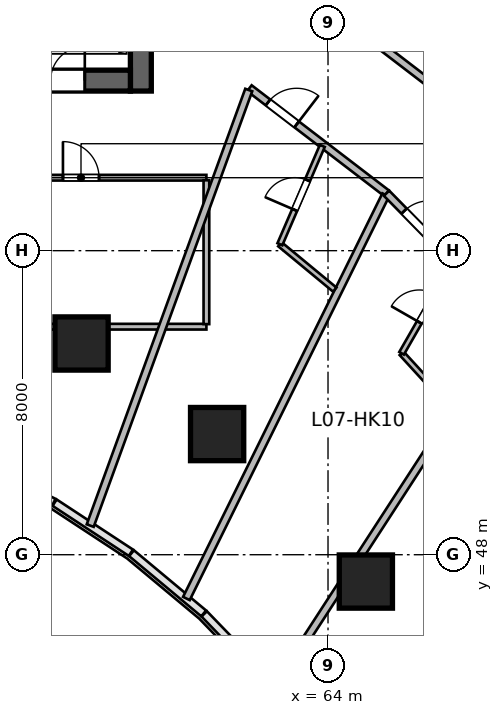
"""IFC4 building model, lengths in metres.
Left out: names, types, materials, properties, quantities, classifications, styles, units other than length and angle.
Written with IfcOpenShell. Run it as: python <this file> out.ifc"""

import sys

from ifc_helpers import new_model, si_unit, direction, frame, frame_2d, origin, origin_2d, place, context, subcontext, project, spatial, rectangle, circle, extrude, source, transform, mapped, element, fill, save


model = new_model("IFC4")
c1 = context("Model", 3, precision=1e-05, world=origin(), true_north=direction((0.0, 1.0)))
c2 = subcontext(c1, "Body", "Model", "MODEL_VIEW")
j1 = project(units=[si_unit("LENGTHUNIT", "METRE"), si_unit("PLANEANGLEUNIT", "RADIAN")], contexts=[c1])
p1 = place(None, origin())
s1 = spatial("IfcSite", under=j1, at=p1, CompositionType="ELEMENT")
p2 = place(p1, origin())
s2 = spatial("IfcBuilding", under=s1, at=p2, CompositionType="ELEMENT")
p3 = place(p2, frame((0.0, 0.0, 39.0)))
s3 = spatial("IfcBuildingStorey", under=s2, at=p3, CompositionType="ELEMENT", Elevation=39.0)
m1 = source(origin(), c2, "Body", "SweptSolid", [
    extrude(rectangle(XDim=12.0, YDim=0.55, at=frame_2d((6.0, 0.0))), origin(), (0.0, 0.0, 1.0), 3.6),
])
p4 = place(p3, frame((59.075, 60.2, 0.0), z_axis=(0.0, 0.0, 1.0), x_axis=(0.0, 1.0, 0.0)))
e1 = element("IfcWall", 1, at=p4, inside=s3, PredefinedType="SHEAR", context=c2, shape_type="MappedRepresentation", body=[
    mapped(m1, transform((0.0, 0.0, 0.0), scale=1.0)),
])
m2 = source(origin(), c2, "Body", "SweptSolid", [
    extrude(rectangle(XDim=21.6, YDim=0.55, at=frame_2d((10.8, 0.0))), origin(), (0.0, 0.0, 1.0), 3.6),
])
p5 = place(p3, frame((37.2, 60.475, 0.0), z_axis=(0.0, 0.0, 1.0), x_axis=(1.0, 0.0, 0.0)))
e2 = element("IfcWall", 2, at=p5, inside=s3, PredefinedType="SHEAR", context=c2, shape_type="MappedRepresentation", body=[
    mapped(m2, transform((0.0, 0.0, 0.0), scale=1.0)),
])
p6 = place(p5, frame((1.1, 0.0, 0.0)))
e3 = element("IfcOpeningElement", 3, at=p6, cuts=e2, PredefinedType="OPENING", context=c2, shape_type="SweptSolid", body=[
    extrude(rectangle(XDim=1.15, YDim=2.15, at=frame_2d((0.575, 1.075))), frame((0.0, 0.285, 0.0), z_axis=(0.0, -1.0, 0.0), x_axis=(1.0, 0.0, 0.0)), (0.0, 0.0, 1.0), 0.57),
])
p7 = place(p5, frame((19.5, 0.0, 0.0)))
e4 = element("IfcOpeningElement", 4, at=p7, cuts=e2, PredefinedType="OPENING", context=c2, shape_type="SweptSolid", body=[
    extrude(rectangle(XDim=0.9, YDim=2.1, at=frame_2d((0.45, 1.05))), frame((0.0, 0.285, 0.0), z_axis=(0.0, -1.0, 0.0), x_axis=(1.0, 0.0, 0.0)), (0.0, 0.0, 1.0), 0.57),
])
p8 = place(p5, frame((12.02, 0.0, 0.0)))
e5 = element("IfcOpeningElement", 5, at=p8, cuts=e2, PredefinedType="OPENING", context=c2, shape_type="SweptSolid", body=[
    extrude(rectangle(XDim=1.6, YDim=2.15, at=frame_2d((0.8, 1.075))), frame((0.0, 0.285, 0.0), z_axis=(0.0, -1.0, 0.0), x_axis=(1.0, 0.0, 0.0)), (0.0, 0.0, 1.0), 0.57),
])
m3 = source(origin(), c2, "Body", "SweptSolid", [
    extrude(circle(Radius=0.7, at=origin_2d()), origin(), (0.0, 0.0, 1.0), 3.6),
])
for number, where, z_axis, x_axis in (
    (6, (57.515, 53.558, 0.0), (0.0, 0.0, 1.0), (0.289, 0.957, 0.0)),
    (7, (61.082, 51.175, 0.0), (0.0, 0.0, 1.0), (0.409, 0.912, 0.0)),
    (8, (64.996, 47.294, 0.0), (0.0, 0.0, 1.0), (0.558, 0.83, 0.0)),
):
    element("IfcColumn", number, at=place(p3, frame(where, z_axis=z_axis, x_axis=x_axis)), inside=s3, PredefinedType="COLUMN", context=c2, shape_type="MappedRepresentation", body=[
        mapped(m3, transform((0.0, 0.0, 0.0), scale=1.0)),
    ])
m4 = source(origin(), c2, "Body", "SweptSolid", [
    extrude(rectangle(XDim=6.6, YDim=0.15, at=frame_2d((3.3, 0.0))), origin(), (0.0, 0.0, 1.0), 2.803),
])
p9 = place(p3, frame((54.2, 54.0, 0.0), z_axis=(0.0, 0.0, 1.0), x_axis=(1.0, 0.0, 0.0)))
e9 = element("IfcWall", 9, at=p9, inside=s3, PredefinedType="PARTITIONING", context=c2, shape_type="MappedRepresentation", body=[
    mapped(m4, transform((0.0, 0.0, 0.0), scale=1.0)),
])
m5 = source(origin(), c2, "Body", "SweptSolid", [
    extrude(rectangle(XDim=6.6, YDim=0.15, at=frame_2d((3.3, 0.0))), origin(), (0.0, 0.0, 1.0), 3.36),
])
p10 = place(p3, frame((54.2, 57.92, 0.0), z_axis=(0.0, 0.0, 1.0), x_axis=(1.0, 0.0, 0.0)))
e10 = element("IfcWall", 10, at=p10, inside=s3, PredefinedType="PARTITIONING", context=c2, shape_type="MappedRepresentation", body=[
    mapped(m5, transform((0.0, 0.0, 0.0), scale=1.0)),
])
p11 = place(p10, frame((2.825, 0.0, 0.0)))
e11 = element("IfcOpeningElement", 11, at=p11, cuts=e10, PredefinedType="OPENING", context=c2, shape_type="SweptSolid", body=[
    extrude(rectangle(XDim=0.95, YDim=2.1, at=frame_2d((0.475, 1.05))), frame((0.0, 0.085, 0.0), z_axis=(0.0, -1.0, 0.0), x_axis=(1.0, 0.0, 0.0)), (0.0, 0.0, 1.0), 0.17),
])
m6 = source(origin(), c2, "Body", "SweptSolid", [
    extrude(rectangle(XDim=3.785, YDim=0.15, at=frame_2d((1.893, 0.0))), origin(), (0.0, 0.0, 1.0), 3.36),
])
p12 = place(p3, frame((60.8, 54.067, 0.0), z_axis=(0.0, 0.0, 1.0), x_axis=(0.0, 1.0, 0.0)))
e12 = element("IfcWall", 12, at=p12, inside=s3, PredefinedType="PARTITIONING", context=c2, shape_type="MappedRepresentation", body=[
    mapped(m6, transform((0.0, 0.0, 0.0), scale=1.0)),
])
m7 = source(origin(), c2, "Body", "SweptSolid", [
    extrude(rectangle(XDim=4.895, YDim=0.195, at=frame_2d((2.447, 0.0))), origin(), (0.0, 0.0, 1.0), 3.36),
])
p13 = place(p3, frame((63.001, 63.214, 0.0), z_axis=(0.0, 0.0, 1.0), x_axis=(0.793896075849, -0.608053468661, 0.0)))
e13 = element("IfcWall", 13, at=p13, inside=s3, PredefinedType="PARTITIONING", context=c2, shape_type="MappedRepresentation", body=[
    mapped(m7, transform((0.0, 0.0, 0.0), scale=1.0)),
])
p14 = place(p13, frame((0.7, 0.0, 0.0)))
e14 = element("IfcOpeningElement", 14, at=p14, cuts=e13, PredefinedType="OPENING", context=c2, shape_type="SweptSolid", body=[
    extrude(rectangle(XDim=0.95, YDim=2.15, at=frame_2d((0.475, 1.075))), frame((0.0, 0.107, 0.0), z_axis=(0.0, -1.0, 0.0), x_axis=(1.0, 0.0, 0.0)), (0.0, 0.0, 1.0), 0.215),
])
m8 = source(origin(), c2, "Body", "SweptSolid", [
    extrude(rectangle(XDim=4.546, YDim=0.195, at=frame_2d((2.273, 0.0))), origin(), (0.0, 0.0, 1.0), 3.36),
])
p15 = place(p3, frame((61.931, 60.275, 0.0), z_axis=(0.0, 0.0, 1.0), x_axis=(0.793907931297, -0.608037989457, 0.0)))
e15 = element("IfcWall", 15, at=p15, inside=s3, PredefinedType="PARTITIONING", context=c2, shape_type="MappedRepresentation", body=[
    mapped(m8, transform((0.0, 0.0, 0.0), scale=1.0)),
])
p16 = place(p15, frame((0.616, 0.0, 0.0)))
e16 = element("IfcOpeningElement", 16, at=p16, cuts=e15, PredefinedType="OPENING", context=c2, shape_type="SweptSolid", body=[
    extrude(rectangle(XDim=0.95, YDim=2.15, at=frame_2d((0.475, 1.075))), frame((0.0, 0.107, 0.0), z_axis=(0.0, -1.0, 0.0), x_axis=(1.0, 0.0, 0.0)), (0.0, 0.0, 1.0), 0.215),
])
m9 = source(origin(), c2, "Body", "SweptSolid", [
    extrude(rectangle(XDim=12.196, YDim=0.195, at=frame_2d((6.098, 0.0))), origin(), (0.0, 0.0, 1.0), 3.36),
])
p17 = place(p3, frame((57.742, 48.766, 0.0), z_axis=(0.0, 0.0, 1.0), x_axis=(0.342022711534, 0.939691686031, 0.0)))
e17 = element("IfcWall", 17, at=p17, inside=s3, PredefinedType="PARTITIONING", context=c2, shape_type="MappedRepresentation", body=[
    mapped(m9, transform((0.0, 0.0, 0.0), scale=1.0)),
])
m10 = source(origin(), c2, "Body", "SweptSolid", [
    extrude(rectangle(XDim=11.844, YDim=0.195, at=frame_2d((5.922, 0.0))), origin(), (0.0, 0.0, 1.0), 3.36),
])
p18 = place(p3, frame((60.273, 46.848, 0.0), z_axis=(0.0, 0.0, 1.0), x_axis=(0.442871152218, 0.896585267854, 0.0)))
e18 = element("IfcWall", 18, at=p18, inside=s3, PredefinedType="PARTITIONING", context=c2, shape_type="MappedRepresentation", body=[
    mapped(m10, transform((0.0, 0.0, 0.0), scale=1.0)),
])
m11 = source(origin(), c2, "Body", "SweptSolid", [
    extrude(rectangle(XDim=1.873, YDim=0.14, at=frame_2d((0.937, 0.0))), origin(), (0.0, 0.0, 1.0), 3.36),
])
p19 = place(p3, frame((62.734, 56.169, 0.0), z_axis=(0.0, 0.0, 1.0), x_axis=(0.77069451688, -0.637204803537, 0.0)))
e19 = element("IfcWall", 19, at=p19, inside=s3, PredefinedType="PARTITIONING", context=c2, shape_type="MappedRepresentation", body=[
    mapped(m11, transform((0.0, 0.0, 0.0), scale=1.0)),
])
m12 = source(origin(), c2, "Body", "SweptSolid", [
    extrude(rectangle(XDim=2.817, YDim=0.14, at=frame_2d((1.409, 0.0))), origin(), (0.0, 0.0, 1.0), 3.36),
])
p20 = place(p3, frame((62.734, 56.169, 0.0), z_axis=(0.0, 0.0, 1.0), x_axis=(0.395999429727, 0.918250756415, 0.0)))
e20 = element("IfcWall", 20, at=p20, inside=s3, PredefinedType="PARTITIONING", context=c2, shape_type="MappedRepresentation", body=[
    mapped(m12, transform((0.0, 0.0, 0.0), scale=1.0)),
])
p21 = place(p20, frame((0.984, 0.0, 0.0)))
e21 = element("IfcOpeningElement", 21, at=p21, cuts=e20, PredefinedType="OPENING", context=c2, shape_type="SweptSolid", body=[
    extrude(rectangle(XDim=0.85, YDim=2.05, at=frame_2d((0.425, 1.025))), frame((0.0, 0.08, 0.0), z_axis=(0.0, -1.0, 0.0), x_axis=(1.0, 0.0, 0.0)), (0.0, 0.0, 1.0), 0.16),
])
m13 = source(origin(), c2, "Body", "SweptSolid", [
    extrude(rectangle(XDim=4.724, YDim=0.195, at=frame_2d((2.362, 0.0))), origin(), (0.0, 0.0, 1.0), 3.36),
])
p22 = place(p3, frame((65.541, 57.511, 0.0), z_axis=(0.0, 0.0, 1.0), x_axis=(0.700435057457, -0.713716141253, 0.0)))
e22 = element("IfcWall", 22, at=p22, inside=s3, PredefinedType="PARTITIONING", context=c2, shape_type="MappedRepresentation", body=[
    mapped(m13, transform((0.0, 0.0, 0.0), scale=1.0)),
])
p23 = place(p22, frame((0.659, 0.0, 0.0)))
e23 = element("IfcOpeningElement", 23, at=p23, cuts=e22, PredefinedType="OPENING", context=c2, shape_type="SweptSolid", body=[
    extrude(rectangle(XDim=0.95, YDim=2.15, at=frame_2d((0.475, 1.075))), frame((0.0, 0.107, 0.0), z_axis=(0.0, -1.0, 0.0), x_axis=(1.0, 0.0, 0.0)), (0.0, 0.0, 1.0), 0.215),
])
m14 = source(origin(), c2, "Body", "SweptSolid", [
    extrude(rectangle(XDim=11.429, YDim=0.195, at=frame_2d((5.714, 0.0))), origin(), (0.0, 0.0, 1.0), 3.36),
])
p24 = place(p3, frame((62.604, 44.511, 0.0), z_axis=(0.0, 0.0, 1.0), x_axis=(0.544215487077, 0.838945471187, 0.0)))
e24 = element("IfcWall", 24, at=p24, inside=s3, PredefinedType="PARTITIONING", context=c2, shape_type="MappedRepresentation", body=[
    mapped(m14, transform((0.0, 0.0, 0.0), scale=1.0)),
])
m15 = source(origin(), c2, "Body", "SweptSolid", [
    extrude(rectangle(XDim=1.947, YDim=0.14, at=frame_2d((0.973, 0.0))), origin(), (0.0, 0.0, 1.0), 2.803),
])
p25 = place(p3, frame((65.936, 53.3, 0.0), z_axis=(0.0, 0.0, 1.0), x_axis=(0.675383794012, -0.737466426888, 0.0)))
e25 = element("IfcWall", 25, at=p25, inside=s3, PredefinedType="PARTITIONING", context=c2, shape_type="MappedRepresentation", body=[
    mapped(m15, transform((0.0, 0.0, 0.0), scale=1.0)),
])
m16 = source(origin(), c2, "Body", "SweptSolid", [
    extrude(rectangle(XDim=2.731, YDim=0.14, at=frame_2d((1.366, 0.0))), origin(), (0.0, 0.0, 1.0), 3.36),
])
p26 = place(p3, frame((65.936, 53.3, 0.0), z_axis=(0.0, 0.0, 1.0), x_axis=(0.497120404056, 0.867681568244, 0.0)))
e26 = element("IfcWall", 26, at=p26, inside=s3, PredefinedType="PARTITIONING", context=c2, shape_type="MappedRepresentation", body=[
    mapped(m16, transform((0.0, 0.0, 0.0), scale=1.0)),
])
p27 = place(p26, frame((0.941, 0.0, 0.0)))
e27 = element("IfcOpeningElement", 27, at=p27, cuts=e26, PredefinedType="OPENING", context=c2, shape_type="SweptSolid", body=[
    extrude(rectangle(XDim=0.85, YDim=2.05, at=frame_2d((0.425, 1.025))), frame((0.0, 0.08, 0.0), z_axis=(0.0, -1.0, 0.0), x_axis=(1.0, 0.0, 0.0)), (0.0, 0.0, 1.0), 0.16),
])
m17 = source(origin(), c2, "Body", "SweptSolid", [
    extrude(rectangle(XDim=11.053, YDim=0.195, at=frame_2d((5.527, 0.0))), origin(), (0.0, 0.0, 1.0), 3.36),
])
p28 = place(p3, frame((64.534, 41.949, 0.0), z_axis=(0.0, 0.0, 1.0), x_axis=(0.638131235571, 0.769927611005, 0.0)))
e28 = element("IfcWall", 28, at=p28, inside=s3, PredefinedType="PARTITIONING", context=c2, shape_type="MappedRepresentation", body=[
    mapped(m17, transform((0.0, 0.0, 0.0), scale=1.0)),
])
m18 = source(origin(), c2, "Body", "SweptSolid", [
    extrude(rectangle(XDim=0.9, YDim=2.1, at=frame_2d((0.45, 1.05))), frame((0.0, 0.025, 0.0), z_axis=(0.0, -1.0, 0.0), x_axis=(1.0, 0.0, 0.0)), (0.0, 0.0, 1.0), 0.05),
])
p29 = place(p7, origin())
e29 = element("IfcDoor", 29, at=p29, inside=s3, OperationType="SINGLE_SWING_RIGHT", PredefinedType="DOOR", context=c2, shape_type="MappedRepresentation", body=[
    mapped(m18, transform((0.0, 0.0, 0.0), scale=1.0)),
])
fill(e4, e29)
m19 = source(origin(), c2, "Body", "SweptSolid", [
    extrude(rectangle(XDim=0.95, YDim=2.1, at=frame_2d((0.475, 1.05))), frame((0.0, 0.025, 0.0), z_axis=(0.0, -1.0, 0.0), x_axis=(1.0, 0.0, 0.0)), (0.0, 0.0, 1.0), 0.05),
])
p30 = place(p11, origin())
e30 = element("IfcDoor", 30, at=p30, inside=s3, OperationType="SINGLE_SWING_LEFT", PredefinedType="DOOR", context=c2, shape_type="MappedRepresentation", body=[
    mapped(m19, transform((0.0, 0.0, 0.0), scale=1.0)),
])
fill(e11, e30)
m20 = source(origin(), c2, "Body", "SweptSolid", [
    extrude(rectangle(XDim=0.95, YDim=2.15, at=frame_2d((0.475, 1.075))), frame((0.0, 0.025, 0.0), z_axis=(0.0, -1.0, 0.0), x_axis=(1.0, 0.0, 0.0)), (0.0, 0.0, 1.0), 0.05),
])
p31 = place(p16, origin())
e31 = element("IfcDoor", 31, at=p31, inside=s3, OperationType="SINGLE_SWING_RIGHT", PredefinedType="DOOR", context=c2, shape_type="MappedRepresentation", body=[
    mapped(m20, transform((0.0, 0.0, 0.0), scale=1.0)),
])
fill(e16, e31)
m21 = source(origin(), c2, "Body", "SweptSolid", [
    extrude(rectangle(XDim=0.85, YDim=2.05, at=frame_2d((0.425, 1.025))), frame((0.0, 0.025, 0.0), z_axis=(0.0, -1.0, 0.0), x_axis=(1.0, 0.0, 0.0)), (0.0, 0.0, 1.0), 0.05),
])
p32 = place(p21, origin())
e32 = element("IfcDoor", 32, at=p32, inside=s3, OperationType="SINGLE_SWING_LEFT", PredefinedType="DOOR", context=c2, shape_type="MappedRepresentation", body=[
    mapped(m21, transform((0.0, 0.0, 0.0), scale=1.0)),
])
fill(e21, e32)
p33 = place(p23, origin())
e33 = element("IfcDoor", 33, at=p33, inside=s3, OperationType="SINGLE_SWING_RIGHT", PredefinedType="DOOR", context=c2, shape_type="MappedRepresentation", body=[
    mapped(m20, transform((0.0, 0.0, 0.0), scale=1.0)),
])
fill(e23, e33)
p34 = place(p27, origin())
e34 = element("IfcDoor", 34, at=p34, inside=s3, OperationType="SINGLE_SWING_LEFT", PredefinedType="DOOR", context=c2, shape_type="MappedRepresentation", body=[
    mapped(m21, transform((0.0, 0.0, 0.0), scale=1.0)),
])
fill(e27, e34)
save(model, sys.argv[1])
